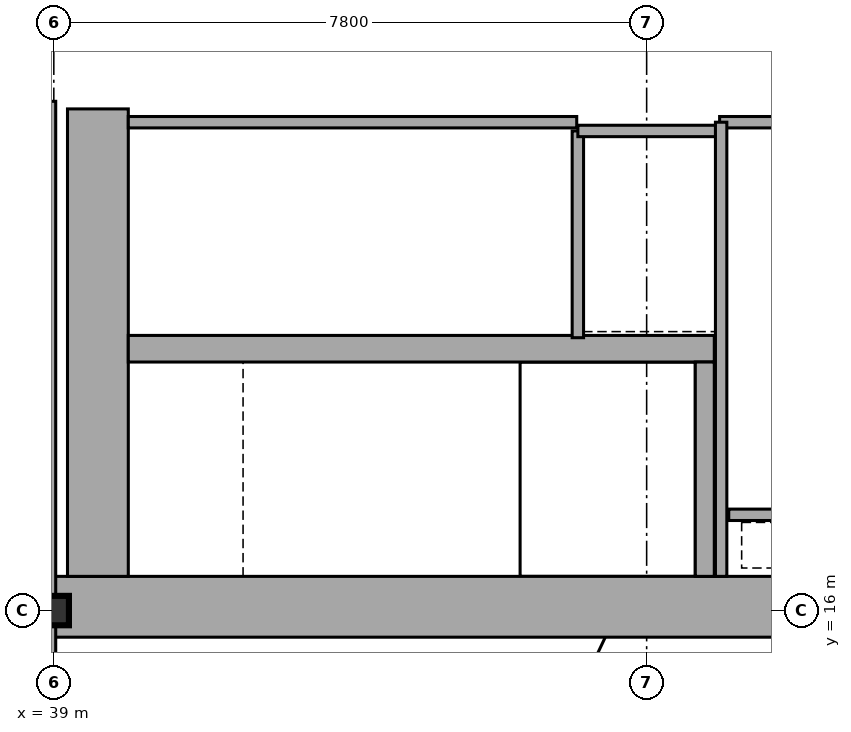
"""IFC4 building model, lengths in metres.
Left out: names, types, materials, properties, quantities, classifications, styles, units other than length and angle.
Written with IfcOpenShell. Run it as: python <this file> out.ifc"""

import sys

from ifc_helpers import new_model, si_unit, direction, frame, frame_2d, origin, origin_2d, place, context, subcontext, project, spatial, rectangle, i_section, extrude, element, fill, save


model = new_model("IFC4")
c1 = context("Model", 3, precision=1e-05, world=origin(), true_north=direction((0.0, 1.0)))
c2 = subcontext(c1, "Body", "Model", "MODEL_VIEW")
j1 = project(units=[si_unit("LENGTHUNIT", "METRE"), si_unit("PLANEANGLEUNIT", "RADIAN")], contexts=[c1])
p1 = place(None, origin())
s1 = spatial("IfcSite", under=j1, at=p1, CompositionType="ELEMENT")
p2 = place(p1, origin())
s2 = spatial("IfcBuilding", under=s1, at=p2, CompositionType="ELEMENT")
p3 = place(p2, frame((0.0, 0.0, 112.05)))
s3 = spatial("IfcBuildingStorey", under=s2, at=p3, CompositionType="ELEMENT", Elevation=112.05)
p4 = place(p3, frame((38.8, 16.05, 0.0), z_axis=(0.0, 0.0, 1.0), x_axis=(1.0, 0.0, 0.0)))
e1 = element("IfcWall", 1, at=p4, inside=s3, PredefinedType="SHEAR", context=c2, shape_type="SweptSolid", body=[
    extrude(rectangle(XDim=16.0, YDim=0.8, at=frame_2d((8.0, 0.0))), origin(), (0.0, 0.0, 1.0), 4.56),
])
p5 = place(p3, frame((39.58, 16.45, 0.0), z_axis=(0.0, 0.0, 1.0), x_axis=(0.0, 1.0, 0.0)))
e2 = element("IfcWall", 2, at=p5, inside=s3, PredefinedType="SHEAR", context=c2, shape_type="SweptSolid", body=[
    extrude(rectangle(XDim=6.15, YDim=0.8, at=frame_2d((3.075, 0.0))), origin(), (0.0, 0.0, 1.0), 4.56),
])
p6 = place(p3, frame((39.98, 19.445, 0.0), z_axis=(0.0, 0.0, 1.0), x_axis=(1.0, 0.0, 0.0)))
e3 = element("IfcWall", 3, at=p6, inside=s3, PredefinedType="SHEAR", context=c2, shape_type="SweptSolid", body=[
    extrude(rectangle(XDim=7.71, YDim=0.35, at=frame_2d((3.855, 0.0))), origin(), (0.0, 0.0, 1.0), 4.56),
])
p7 = place(p6, frame((0.25, 0.0, 0.0)))
e4 = element("IfcOpeningElement", 4, at=p7, cuts=e3, PredefinedType="OPENING", context=c2, shape_type="SweptSolid", body=[
    extrude(rectangle(XDim=1.1, YDim=2.15, at=frame_2d((0.55, 1.075))), frame((0.0, 0.185, 0.0), z_axis=(0.0, -1.0, 0.0), x_axis=(1.0, 0.0, 0.0)), (0.0, 0.0, 1.0), 0.37),
])
p8 = place(p3, frame((47.565, 16.45, 0.0), z_axis=(0.0, 0.0, 1.0), x_axis=(0.0, 1.0, 0.0)))
e5 = element("IfcWall", 5, at=p8, inside=s3, PredefinedType="SHEAR", context=c2, shape_type="SweptSolid", body=[
    extrude(rectangle(XDim=2.82, YDim=0.25, at=frame_2d((1.41, 0.0))), origin(), (0.0, 0.0, 1.0), 4.56),
])
p9 = place(p3, frame((39.0, 16.0, 0.0), z_axis=(0.0, 0.0, 1.0), x_axis=(1.0, 0.0, 0.0)))
e6 = element("IfcColumn", 6, at=p9, inside=s3, PredefinedType="COLUMN", context=c2, shape_type="SweptSolid", body=[
    extrude(i_section(OverallWidth=0.398, OverallDepth=0.387, WebThickness=0.021, FlangeThickness=0.033, at=origin_2d()), origin(), (0.0, 0.0, 1.0), 4.794),
])
p10 = place(p3, frame((39.98, 22.425, 0.0), z_axis=(0.0, 0.0, 1.0), x_axis=(1.0, 0.0, 0.0)))
e7 = element("IfcWall", 7, at=p10, inside=s3, PredefinedType="PARTITIONING", context=c2, shape_type="SweptSolid", body=[
    extrude(rectangle(XDim=5.9, YDim=0.15, at=frame_2d((2.95, 0.0))), origin(), (0.0, 0.0, 1.0), 4.56),
])
p11 = place(p10, frame((2.35, 0.0, 0.0)))
e8 = element("IfcOpeningElement", 8, at=p11, cuts=e7, PredefinedType="OPENING", context=c2, shape_type="SweptSolid", body=[
    extrude(rectangle(XDim=1.05, YDim=2.15, at=frame_2d((0.525, 1.075))), frame((0.0, 0.085, 0.0), z_axis=(0.0, -1.0, 0.0), x_axis=(1.0, 0.0, 0.0)), (0.0, 0.0, 1.0), 0.17),
])
p12 = place(p3, frame((45.895, 19.59, 0.0), z_axis=(0.0, 0.0, 1.0), x_axis=(0.0, 1.0, 0.0)))
e9 = element("IfcWall", 9, at=p12, inside=s3, PredefinedType="PARTITIONING", context=c2, shape_type="SweptSolid", body=[
    extrude(rectangle(XDim=2.72, YDim=0.15, at=frame_2d((1.36, 0.0))), origin(), (0.0, 0.0, 1.0), 4.56),
])
p13 = place(p12, frame((0.81, 0.0, 0.0)))
e10 = element("IfcOpeningElement", 10, at=p13, cuts=e9, PredefinedType="OPENING", context=c2, shape_type="SweptSolid", body=[
    extrude(rectangle(XDim=1.1, YDim=2.15, at=frame_2d((0.55, 1.075))), frame((0.0, 0.085, 0.0), z_axis=(0.0, -1.0, 0.0), x_axis=(1.0, 0.0, 0.0)), (0.0, 0.0, 1.0), 0.17),
])
p14 = place(p3, frame((45.895, 22.31, 0.0), z_axis=(0.0, 0.0, 1.0), x_axis=(1.0, 0.0, 0.0)))
e11 = element("IfcWall", 11, at=p14, inside=s3, PredefinedType="PARTITIONING", context=c2, shape_type="SweptSolid", body=[
    extrude(rectangle(XDim=1.915, YDim=0.15, at=frame_2d((0.958, 0.0))), origin(), (0.0, 0.0, 1.0), 4.56),
])
p15 = place(p3, frame((47.88, 17.26, 0.0), z_axis=(0.0, 0.0, 1.0), x_axis=(1.0, 0.0, 0.0)))
e12 = element("IfcWall", 12, at=p15, inside=s3, PredefinedType="PARTITIONING", context=c2, shape_type="SweptSolid", body=[
    extrude(rectangle(XDim=1.72, YDim=0.15, at=frame_2d((0.86, 0.0))), origin(), (0.0, 0.0, 1.0), 4.56),
])
p16 = place(p15, frame((0.42, 0.0, 0.0)))
e13 = element("IfcOpeningElement", 13, at=p16, cuts=e12, PredefinedType="OPENING", context=c2, shape_type="SweptSolid", body=[
    extrude(rectangle(XDim=0.85, YDim=2.15, at=frame_2d((0.425, 1.075))), frame((0.0, 0.085, 0.0), z_axis=(0.0, -1.0, 0.0), x_axis=(1.0, 0.0, 0.0)), (0.0, 0.0, 1.0), 0.17),
])
p17 = place(p3, frame((47.76, 22.425, 0.0), z_axis=(0.0, 0.0, 1.0), x_axis=(1.0, 0.0, 0.0)))
e14 = element("IfcWall", 14, at=p17, inside=s3, PredefinedType="PARTITIONING", context=c2, shape_type="SweptSolid", body=[
    extrude(rectangle(XDim=1.96, YDim=0.15, at=frame_2d((0.98, 0.0))), origin(), (0.0, 0.0, 1.0), 4.56),
])
p18 = place(p3, frame((47.78, 16.45, 0.0), z_axis=(0.0, 0.0, 1.0), x_axis=(0.0, 1.0, 0.0)))
e15 = element("IfcWall", 15, at=p18, inside=s3, PredefinedType="PARTITIONING", context=c2, shape_type="SweptSolid", body=[
    extrude(rectangle(XDim=5.975, YDim=0.15, at=frame_2d((2.988, 0.0))), origin(), (0.0, 0.0, 1.0), 4.56),
])
p19 = place(p3, frame((38.95, 14.5, 0.0), z_axis=(0.0, 0.0, 1.0), x_axis=(0.0, 1.0, 0.0)))
e16 = element("IfcWall", 16, at=p19, inside=s3, PredefinedType="PARTITIONING", context=c2, shape_type="SweptSolid", body=[
    extrude(rectangle(XDim=8.2, YDim=0.15, at=frame_2d((4.1, 0.0))), origin(), (0.0, 0.0, 1.0), 3.94),
])
p20 = place(p11, frame((1.05, 0.0, 0.0), z_axis=(0.0, 0.0, 1.0), x_axis=(-1.0, 0.0, 0.0)))
e17 = element("IfcDoor", 17, at=p20, inside=s3, OperationType="SINGLE_SWING_RIGHT", PredefinedType="DOOR", context=c2, shape_type="SweptSolid", body=[
    extrude(rectangle(XDim=1.05, YDim=2.15, at=frame_2d((0.525, 1.075))), frame((0.0, 0.025, 0.0), z_axis=(0.0, -1.0, 0.0), x_axis=(1.0, 0.0, 0.0)), (0.0, 0.0, 1.0), 0.05),
])
fill(e8, e17)
p21 = place(p13, frame((1.1, 0.0, 0.0), z_axis=(0.0, 0.0, 1.0), x_axis=(-1.0, 0.0, 0.0)))
e18 = element("IfcDoor", 18, at=p21, inside=s3, OperationType="DOUBLE_DOOR_SLIDING", PredefinedType="DOOR", context=c2, shape_type="SweptSolid", body=[
    extrude(rectangle(XDim=1.1, YDim=2.15, at=frame_2d((0.55, 1.075))), frame((0.0, 0.025, 0.0), z_axis=(0.0, -1.0, 0.0), x_axis=(1.0, 0.0, 0.0)), (0.0, 0.0, 1.0), 0.05),
])
fill(e10, e18)
p22 = place(p16, origin())
e19 = element("IfcDoor", 19, at=p22, inside=s3, OperationType="SINGLE_SWING_LEFT", PredefinedType="TRAPDOOR", context=c2, shape_type="SweptSolid", body=[
    extrude(rectangle(XDim=0.85, YDim=2.15, at=frame_2d((0.425, 1.075))), frame((0.0, 0.025, 0.0), z_axis=(0.0, -1.0, 0.0), x_axis=(1.0, 0.0, 0.0)), (0.0, 0.0, 1.0), 0.05),
])
fill(e13, e19)
p23 = place(p7, frame((1.1, 0.0, 0.0), z_axis=(0.0, 0.0, 1.0), x_axis=(-1.0, 0.0, 0.0)))
e20 = element("IfcDoor", 20, at=p23, inside=s3, OperationType="SINGLE_SWING_LEFT", PredefinedType="DOOR", context=c2, shape_type="SweptSolid", body=[
    extrude(rectangle(XDim=1.1, YDim=2.15, at=frame_2d((0.55, 1.075))), frame((0.0, 0.025, 0.0), z_axis=(0.0, -1.0, 0.0), x_axis=(1.0, 0.0, 0.0)), (0.0, 0.0, 1.0), 0.05),
])
fill(e4, e20)
save(model, sys.argv[1])
